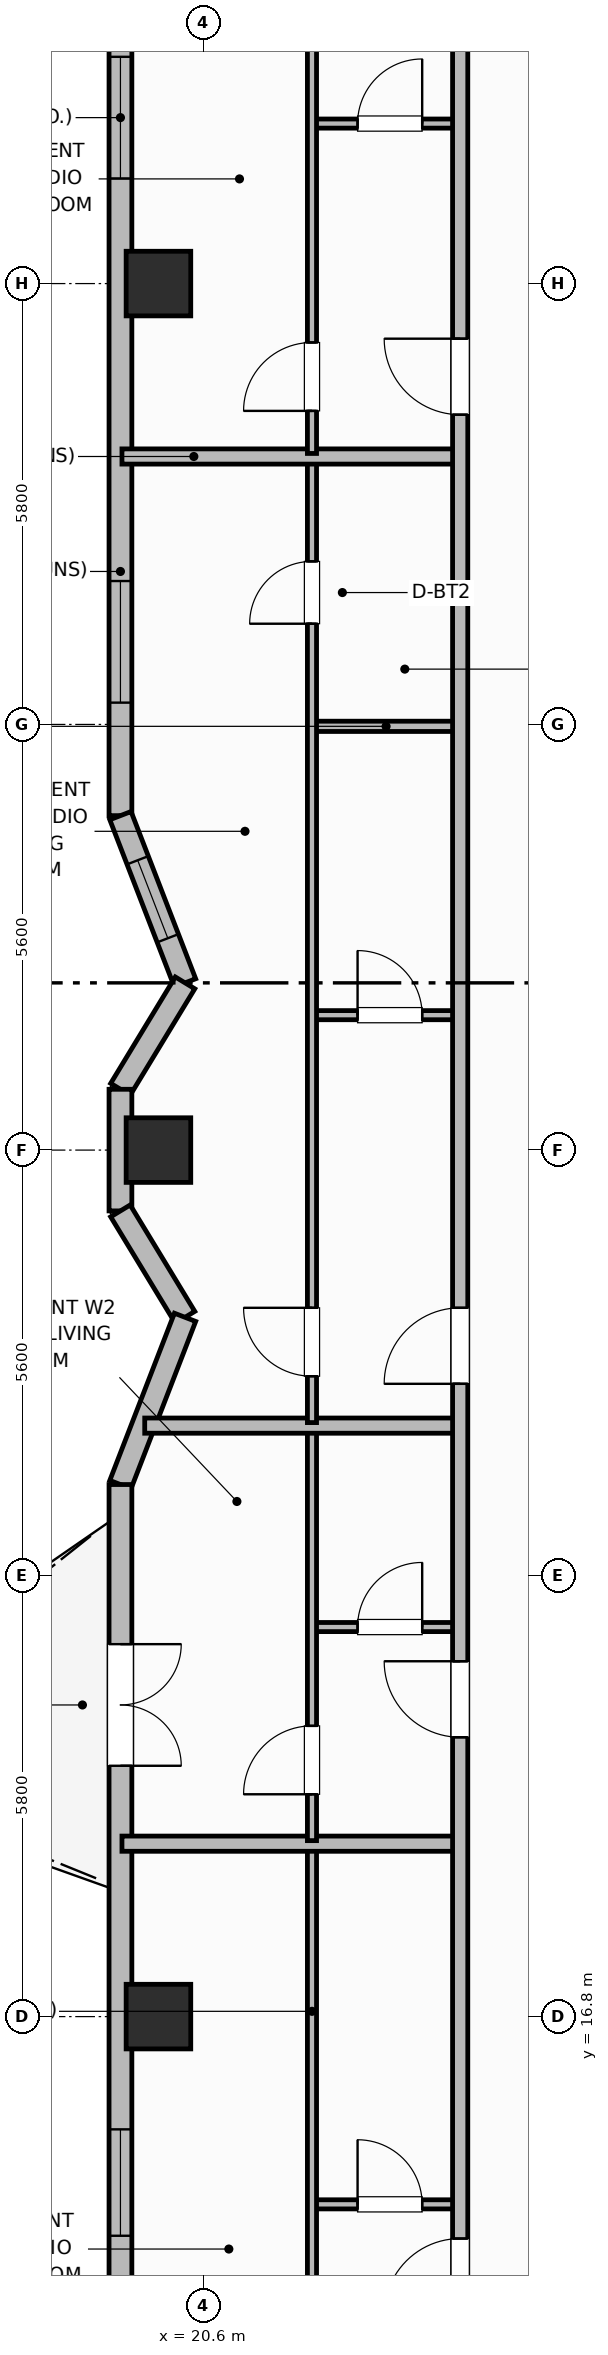
"""IFC4 building model, lengths in metres.
Left out: names, types, materials, properties, quantities, classifications, styles, units other than length and angle.
Written with IfcOpenShell. Run it as: python <this file> out.ifc"""

import sys

from ifc_helpers import new_model, si_unit, direction, frame, frame_2d, origin, origin_2d, place, context, subcontext, project, spatial, rectangle, extrude, element, fill, save


model = new_model("IFC4")
c1 = context("Model", 3, precision=1e-05, world=origin(), true_north=direction((0.0, 1.0)))
c2 = subcontext(c1, "Body", "Model", "MODEL_VIEW")
j1 = project(units=[si_unit("LENGTHUNIT", "METRE"), si_unit("PLANEANGLEUNIT", "RADIAN")], contexts=[c1])
p1 = place(None, origin())
s1 = spatial("IfcSite", under=j1, at=p1, CompositionType="ELEMENT")
p2 = place(p1, origin())
s2 = spatial("IfcBuilding", under=s1, at=p2, CompositionType="ELEMENT")
p3 = place(p2, frame((0.0, 0.0, 229.5)))
s3 = spatial("IfcBuildingStorey", under=s2, at=p3, CompositionType="ELEMENT", Elevation=229.5)
for number, where, z_axis, x_axis in (
    (1, (20.01, 16.8, 0.0), (0.0, 0.0, 1.0), (1.0, 0.0, 0.0)),
    (2, (20.01, 28.2, 0.0), (0.0, 0.0, 1.0), (1.0, 0.0, 0.0)),
    (3, (20.01, 39.6, 0.0), (0.0, 0.0, 1.0), (1.0, 0.0, 0.0)),
):
    element("IfcColumn", number, at=place(p3, frame(where, z_axis=z_axis, x_axis=x_axis)), inside=s3, PredefinedType="COLUMN", context=c2, shape_type="SweptSolid", body=[
        extrude(rectangle(XDim=0.85, YDim=0.85, at=origin_2d()), origin(), (0.0, 0.0, 1.0), 3.7),
    ])
p4 = place(p3, frame((19.51, 43.72, 0.0), z_axis=(0.0, 0.0, 1.0), x_axis=(0.0, -1.0, 0.0)))
e4 = element("IfcWall", 4, at=p4, inside=s3, PredefinedType="SOLIDWALL", context=c2, shape_type="SweptSolid", body=[
    extrude(rectangle(XDim=11.12, YDim=0.3, at=frame_2d((5.56, 0.0))), origin(), (0.0, 0.0, 1.0), 2.73),
])
p5 = place(p4, frame((1.137, 0.0, 0.71)))
e5 = element("IfcOpeningElement", 5, at=p5, cuts=e4, PredefinedType="OPENING", context=c2, shape_type="SweptSolid", body=[
    extrude(rectangle(XDim=1.6, YDim=1.9, at=frame_2d((0.8, 0.95))), frame((0.0, 0.16, 0.0), z_axis=(0.0, -1.0, 0.0), x_axis=(1.0, 0.0, 0.0)), (0.0, 0.0, 1.0), 0.32),
])
p6 = place(p4, frame((8.033, 0.0, 0.71)))
e6 = element("IfcOpeningElement", 6, at=p6, cuts=e4, PredefinedType="OPENING", context=c2, shape_type="SweptSolid", body=[
    extrude(rectangle(XDim=1.6, YDim=1.9, at=frame_2d((0.8, 0.95))), frame((0.0, 0.16, 0.0), z_axis=(0.0, -1.0, 0.0), x_axis=(1.0, 0.0, 0.0)), (0.0, 0.0, 1.0), 0.32),
])
p7 = place(p3, frame((19.51, 32.6, 0.0), z_axis=(0.0, 0.0, 1.0), x_axis=(0.36040746662, -0.932794971044, 0.0)))
e7 = element("IfcWall", 7, at=p7, inside=s3, PredefinedType="SOLIDWALL", context=c2, shape_type="SweptSolid", body=[
    extrude(rectangle(XDim=2.359, YDim=0.3, at=frame_2d((1.179, 0.0))), origin(), (0.0, 0.0, 1.0), 2.73),
])
p8 = place(p7, frame((0.629, 0.0, 0.92)))
e8 = element("IfcOpeningElement", 8, at=p8, cuts=e7, PredefinedType="OPENING", context=c2, shape_type="SweptSolid", body=[
    extrude(rectangle(XDim=1.1, YDim=1.65, at=frame_2d((0.55, 0.825))), frame((0.0, 0.16, 0.0), z_axis=(0.0, -1.0, 0.0), x_axis=(1.0, 0.0, 0.0)), (0.0, 0.0, 1.0), 0.32),
])
p9 = place(p3, frame((20.36, 30.4, 0.0), z_axis=(0.0, 0.0, 1.0), x_axis=(-0.5190481505, -0.854745001426, 0.0)))
e9 = element("IfcWall", 9, at=p9, inside=s3, PredefinedType="SOLIDWALL", context=c2, shape_type="SweptSolid", body=[
    extrude(rectangle(XDim=1.638, YDim=0.3, at=frame_2d((0.819, 0.0))), origin(), (0.0, 0.0, 1.0), 2.73),
])
p10 = place(p3, frame((19.51, 29.0, 0.0), z_axis=(0.0, 0.0, 1.0), x_axis=(0.0, -1.0, 0.0)))
e10 = element("IfcWall", 10, at=p10, inside=s3, PredefinedType="SOLIDWALL", context=c2, shape_type="SweptSolid", body=[
    extrude(rectangle(XDim=1.6, YDim=0.3, at=frame_2d((0.8, 0.0))), origin(), (0.0, 0.0, 1.0), 2.73),
])
p11 = place(p3, frame((19.51, 27.4, 0.0), z_axis=(0.0, 0.0, 1.0), x_axis=(0.5190481505, -0.854745001426, 0.0)))
e11 = element("IfcWall", 11, at=p11, inside=s3, PredefinedType="SOLIDWALL", context=c2, shape_type="SweptSolid", body=[
    extrude(rectangle(XDim=1.638, YDim=0.3, at=frame_2d((0.819, 0.0))), origin(), (0.0, 0.0, 1.0), 2.73),
])
p12 = place(p3, frame((20.36, 26.0, 0.0), z_axis=(0.0, 0.0, 1.0), x_axis=(-0.360442266984, -0.932781524351, 0.0)))
e12 = element("IfcWall", 12, at=p12, inside=s3, PredefinedType="SOLIDWALL", context=c2, shape_type="SweptSolid", body=[
    extrude(rectangle(XDim=2.358, YDim=0.3, at=frame_2d((1.179, 0.0))), origin(), (0.0, 0.0, 1.0), 2.73),
])
p13 = place(p3, frame((19.51, 23.8, 0.0), z_axis=(0.0, 0.0, 1.0), x_axis=(0.0, -1.0, 0.0)))
e13 = element("IfcWall", 13, at=p13, inside=s3, PredefinedType="SOLIDWALL", context=c2, shape_type="SweptSolid", body=[
    extrude(rectangle(XDim=11.12, YDim=0.3, at=frame_2d((5.56, 0.0))), origin(), (0.0, 0.0, 1.0), 2.73),
])
p14 = place(p13, frame((2.1, 0.0, 0.0)))
e14 = element("IfcOpeningElement", 14, at=p14, cuts=e13, PredefinedType="OPENING", context=c2, shape_type="SweptSolid", body=[
    extrude(rectangle(XDim=1.6, YDim=2.1, at=frame_2d((0.8, 1.05))), frame((0.0, 0.16, 0.0), z_axis=(0.0, -1.0, 0.0), x_axis=(1.0, 0.0, 0.0)), (0.0, 0.0, 1.0), 0.32),
])
p15 = place(p13, frame((8.483, 0.0, 0.76)))
e15 = element("IfcOpeningElement", 15, at=p15, cuts=e13, PredefinedType="OPENING", context=c2, shape_type="SweptSolid", body=[
    extrude(rectangle(XDim=1.4, YDim=1.85, at=frame_2d((0.7, 0.925))), frame((0.0, 0.16, 0.0), z_axis=(0.0, -1.0, 0.0), x_axis=(1.0, 0.0, 0.0)), (0.0, 0.0, 1.0), 0.32),
])
p16 = place(p3, frame((22.03, 14.33, 0.0), z_axis=(0.0, 0.0, 1.0), x_axis=(1.0, 0.0, 0.0)))
e16 = element("IfcWall", 16, at=p16, inside=s3, PredefinedType="PARTITIONING", context=c2, shape_type="SweptSolid", body=[
    extrude(rectangle(XDim=1.95, YDim=0.12, at=frame_2d((0.975, 0.0))), origin(), (0.0, 0.0, 1.0), 2.56),
])
p17 = place(p16, frame((0.6, 0.0, 0.0)))
e17 = element("IfcOpeningElement", 17, at=p17, cuts=e16, PredefinedType="OPENING", context=c2, shape_type="SweptSolid", body=[
    extrude(rectangle(XDim=0.85, YDim=2.1, at=frame_2d((0.425, 1.05))), frame((0.0, 0.07, 0.0), z_axis=(0.0, -1.0, 0.0), x_axis=(1.0, 0.0, 0.0)), (0.0, 0.0, 1.0), 0.14),
])
p18 = place(p3, frame((22.03, 9.99, 0.0), z_axis=(0.0, 0.0, 1.0), x_axis=(0.0, 1.0, 0.0)))
e18 = element("IfcWall", 18, at=p18, inside=s3, PredefinedType="PARTITIONING", context=c2, shape_type="SweptSolid", body=[
    extrude(rectangle(XDim=9.045, YDim=0.12, at=frame_2d((4.522, 0.0))), origin(), (0.0, 0.0, 1.0), 2.56),
])
p19 = place(p18, frame((0.41, 0.0, 0.0)))
e19 = element("IfcOpeningElement", 19, at=p19, cuts=e18, PredefinedType="OPENING", context=c2, shape_type="SweptSolid", body=[
    extrude(rectangle(XDim=0.9, YDim=2.1, at=frame_2d((0.45, 1.05))), frame((0.0, 0.07, 0.0), z_axis=(0.0, -1.0, 0.0), x_axis=(1.0, 0.0, 0.0)), (0.0, 0.0, 1.0), 0.14),
])
p20 = place(p3, frame((19.53, 19.075, 0.0), z_axis=(0.0, 0.0, 1.0), x_axis=(1.0, 0.0, 0.0)))
e20 = element("IfcWall", 20, at=p20, inside=s3, PredefinedType="PARTITIONING", context=c2, shape_type="SweptSolid", body=[
    extrude(rectangle(XDim=4.45, YDim=0.2, at=frame_2d((2.225, 0.0))), origin(), (0.0, 0.0, 1.0), 2.56),
])
p21 = place(p3, frame((22.03, 21.925, 0.0), z_axis=(0.0, 0.0, 1.0), x_axis=(1.0, 0.0, 0.0)))
e21 = element("IfcWall", 21, at=p21, inside=s3, PredefinedType="PARTITIONING", context=c2, shape_type="SweptSolid", body=[
    extrude(rectangle(XDim=1.95, YDim=0.12, at=frame_2d((0.975, 0.0))), origin(), (0.0, 0.0, 1.0), 2.56),
])
p22 = place(p21, frame((0.6, 0.0, 0.0)))
e22 = element("IfcOpeningElement", 22, at=p22, cuts=e21, PredefinedType="OPENING", context=c2, shape_type="SweptSolid", body=[
    extrude(rectangle(XDim=0.85, YDim=2.1, at=frame_2d((0.425, 1.05))), frame((0.0, 0.07, 0.0), z_axis=(0.0, -1.0, 0.0), x_axis=(1.0, 0.0, 0.0)), (0.0, 0.0, 1.0), 0.14),
])
p23 = place(p3, frame((22.03, 19.115, 0.0), z_axis=(0.0, 0.0, 1.0), x_axis=(0.0, 1.0, 0.0)))
e23 = element("IfcWall", 23, at=p23, inside=s3, PredefinedType="PARTITIONING", context=c2, shape_type="SweptSolid", body=[
    extrude(rectangle(XDim=5.42, YDim=0.12, at=frame_2d((2.71, 0.0))), origin(), (0.0, 0.0, 1.0), 2.56),
])
p24 = place(p23, frame((0.61, 0.0, 0.0)))
e24 = element("IfcOpeningElement", 24, at=p24, cuts=e23, PredefinedType="OPENING", context=c2, shape_type="SweptSolid", body=[
    extrude(rectangle(XDim=0.9, YDim=2.1, at=frame_2d((0.45, 1.05))), frame((0.0, 0.07, 0.0), z_axis=(0.0, -1.0, 0.0), x_axis=(1.0, 0.0, 0.0)), (0.0, 0.0, 1.0), 0.14),
])
p25 = place(p3, frame((19.829, 24.575, 0.0), z_axis=(0.0, 0.0, 1.0), x_axis=(1.0, 0.0, 0.0)))
e25 = element("IfcWall", 25, at=p25, inside=s3, PredefinedType="PARTITIONING", context=c2, shape_type="SweptSolid", body=[
    extrude(rectangle(XDim=4.151, YDim=0.2, at=frame_2d((2.075, 0.0))), origin(), (0.0, 0.0, 1.0), 2.56),
])
p26 = place(p3, frame((22.03, 29.975, 0.0), z_axis=(0.0, 0.0, 1.0), x_axis=(1.0, 0.0, 0.0)))
e26 = element("IfcWall", 26, at=p26, inside=s3, PredefinedType="PARTITIONING", context=c2, shape_type="SweptSolid", body=[
    extrude(rectangle(XDim=1.95, YDim=0.12, at=frame_2d((0.975, 0.0))), origin(), (0.0, 0.0, 1.0), 2.56),
])
p27 = place(p26, frame((0.6, 0.0, 0.0)))
e27 = element("IfcOpeningElement", 27, at=p27, cuts=e26, PredefinedType="OPENING", context=c2, shape_type="SweptSolid", body=[
    extrude(rectangle(XDim=0.85, YDim=2.1, at=frame_2d((0.425, 1.05))), frame((0.0, 0.07, 0.0), z_axis=(0.0, -1.0, 0.0), x_axis=(1.0, 0.0, 0.0)), (0.0, 0.0, 1.0), 0.14),
])
p28 = place(p3, frame((22.03, 33.775, 0.0), z_axis=(0.0, 0.0, 1.0), x_axis=(1.0, 0.0, 0.0)))
e28 = element("IfcWall", 28, at=p28, inside=s3, PredefinedType="PARTITIONING", context=c2, shape_type="SweptSolid", body=[
    extrude(rectangle(XDim=1.95, YDim=0.135, at=frame_2d((0.975, 0.0))), origin(), (0.0, 0.0, 1.0), 2.56),
])
p29 = place(p3, frame((22.03, 24.615, 0.0), z_axis=(0.0, 0.0, 1.0), x_axis=(0.0, 1.0, 0.0)))
e29 = element("IfcWall", 29, at=p29, inside=s3, PredefinedType="PARTITIONING", context=c2, shape_type="SweptSolid", body=[
    extrude(rectangle(XDim=12.67, YDim=0.12, at=frame_2d((6.335, 0.0))), origin(), (0.0, 0.0, 1.0), 2.56),
])
p30 = place(p29, frame((0.61, 0.0, 0.0)))
e30 = element("IfcOpeningElement", 30, at=p30, cuts=e29, PredefinedType="OPENING", context=c2, shape_type="SweptSolid", body=[
    extrude(rectangle(XDim=0.9, YDim=2.1, at=frame_2d((0.45, 1.05))), frame((0.0, 0.07, 0.0), z_axis=(0.0, -1.0, 0.0), x_axis=(1.0, 0.0, 0.0)), (0.0, 0.0, 1.0), 0.14),
])
p31 = place(p29, frame((10.51, 0.0, 0.0)))
e31 = element("IfcOpeningElement", 31, at=p31, cuts=e29, PredefinedType="OPENING", context=c2, shape_type="SweptSolid", body=[
    extrude(rectangle(XDim=0.82, YDim=2.08, at=frame_2d((0.41, 1.04))), frame((0.0, 0.07, 0.0), z_axis=(0.0, -1.0, 0.0), x_axis=(1.0, 0.0, 0.0)), (0.0, 0.0, 1.0), 0.14),
])
p32 = place(p3, frame((19.53, 37.325, 0.0), z_axis=(0.0, 0.0, 1.0), x_axis=(1.0, 0.0, 0.0)))
e32 = element("IfcWall", 32, at=p32, inside=s3, PredefinedType="PARTITIONING", context=c2, shape_type="SweptSolid", body=[
    extrude(rectangle(XDim=4.45, YDim=0.2, at=frame_2d((2.225, 0.0))), origin(), (0.0, 0.0, 1.0), 2.56),
])
p33 = place(p3, frame((22.03, 41.705, 0.0), z_axis=(0.0, 0.0, 1.0), x_axis=(1.0, 0.0, 0.0)))
e33 = element("IfcWall", 33, at=p33, inside=s3, PredefinedType="PARTITIONING", context=c2, shape_type="SweptSolid", body=[
    extrude(rectangle(XDim=1.95, YDim=0.12, at=frame_2d((0.975, 0.0))), origin(), (0.0, 0.0, 1.0), 2.56),
])
p34 = place(p33, frame((0.6, 0.0, 0.0)))
e34 = element("IfcOpeningElement", 34, at=p34, cuts=e33, PredefinedType="OPENING", context=c2, shape_type="SweptSolid", body=[
    extrude(rectangle(XDim=0.85, YDim=2.1, at=frame_2d((0.425, 1.05))), frame((0.0, 0.07, 0.0), z_axis=(0.0, -1.0, 0.0), x_axis=(1.0, 0.0, 0.0)), (0.0, 0.0, 1.0), 0.14),
])
p35 = place(p3, frame((22.03, 37.365, 0.0), z_axis=(0.0, 0.0, 1.0), x_axis=(0.0, 1.0, 0.0)))
e35 = element("IfcWall", 35, at=p35, inside=s3, PredefinedType="PARTITIONING", context=c2, shape_type="SweptSolid", body=[
    extrude(rectangle(XDim=9.045, YDim=0.12, at=frame_2d((4.522, 0.0))), origin(), (0.0, 0.0, 1.0), 2.56),
])
p36 = place(p35, frame((0.56, 0.0, 0.0)))
e36 = element("IfcOpeningElement", 36, at=p36, cuts=e35, PredefinedType="OPENING", context=c2, shape_type="SweptSolid", body=[
    extrude(rectangle(XDim=0.9, YDim=2.1, at=frame_2d((0.45, 1.05))), frame((0.0, 0.07, 0.0), z_axis=(0.0, -1.0, 0.0), x_axis=(1.0, 0.0, 0.0)), (0.0, 0.0, 1.0), 0.14),
])
p37 = place(p3, frame((23.98, 9.95, 0.0), z_axis=(0.0, 0.0, 1.0), x_axis=(0.0, 1.0, 0.0)))
e37 = element("IfcWall", 37, at=p37, inside=s3, PredefinedType="PARTITIONING", context=c2, shape_type="SweptSolid", body=[
    extrude(rectangle(XDim=36.5, YDim=0.2, at=frame_2d((18.25, 0.0))), origin(), (0.0, 0.0, 1.0), 2.56),
])
p38 = place(p37, frame((2.93, 0.0, 0.0)))
e38 = element("IfcOpeningElement", 38, at=p38, cuts=e37, PredefinedType="OPENING", context=c2, shape_type="SweptSolid", body=[
    extrude(rectangle(XDim=1.0, YDim=2.15, at=frame_2d((0.5, 1.075))), frame((0.0, 0.11, 0.0), z_axis=(0.0, -1.0, 0.0), x_axis=(1.0, 0.0, 0.0)), (0.0, 0.0, 1.0), 0.22),
])
p39 = place(p37, frame((10.525, 0.0, 0.0)))
e39 = element("IfcOpeningElement", 39, at=p39, cuts=e37, PredefinedType="OPENING", context=c2, shape_type="SweptSolid", body=[
    extrude(rectangle(XDim=1.0, YDim=2.15, at=frame_2d((0.5, 1.075))), frame((0.0, 0.11, 0.0), z_axis=(0.0, -1.0, 0.0), x_axis=(1.0, 0.0, 0.0)), (0.0, 0.0, 1.0), 0.22),
])
p40 = place(p37, frame((15.175, 0.0, 0.0)))
e40 = element("IfcOpeningElement", 40, at=p40, cuts=e37, PredefinedType="OPENING", context=c2, shape_type="SweptSolid", body=[
    extrude(rectangle(XDim=1.0, YDim=2.15, at=frame_2d((0.5, 1.075))), frame((0.0, 0.11, 0.0), z_axis=(0.0, -1.0, 0.0), x_axis=(1.0, 0.0, 0.0)), (0.0, 0.0, 1.0), 0.22),
])
p41 = place(p37, frame((27.925, 0.0, 0.0)))
e41 = element("IfcOpeningElement", 41, at=p41, cuts=e37, PredefinedType="OPENING", context=c2, shape_type="SweptSolid", body=[
    extrude(rectangle(XDim=1.0, YDim=2.15, at=frame_2d((0.5, 1.075))), frame((0.0, 0.11, 0.0), z_axis=(0.0, -1.0, 0.0), x_axis=(1.0, 0.0, 0.0)), (0.0, 0.0, 1.0), 0.22),
])
p42 = place(p5, origin())
e42 = element("IfcWindow", 42, at=p42, inside=s3, PartitioningType="SINGLE_PANEL", PredefinedType="WINDOW", context=c2, shape_type="SweptSolid", body=[
    extrude(rectangle(XDim=1.6, YDim=1.9, at=frame_2d((0.8, 0.95))), frame((0.0, 0.03, 0.0), z_axis=(0.0, -1.0, 0.0), x_axis=(1.0, 0.0, 0.0)), (0.0, 0.0, 1.0), 0.06),
])
fill(e5, e42)
p43 = place(p6, origin())
e43 = element("IfcWindow", 43, at=p43, inside=s3, PartitioningType="SINGLE_PANEL", PredefinedType="WINDOW", context=c2, shape_type="SweptSolid", body=[
    extrude(rectangle(XDim=1.6, YDim=1.9, at=frame_2d((0.8, 0.95))), frame((0.0, 0.03, 0.0), z_axis=(0.0, -1.0, 0.0), x_axis=(1.0, 0.0, 0.0)), (0.0, 0.0, 1.0), 0.06),
])
fill(e6, e43)
p44 = place(p8, origin())
e44 = element("IfcWindow", 44, at=p44, inside=s3, PartitioningType="SINGLE_PANEL", PredefinedType="WINDOW", context=c2, shape_type="SweptSolid", body=[
    extrude(rectangle(XDim=1.1, YDim=1.65, at=frame_2d((0.55, 0.825))), frame((0.0, 0.03, 0.0), z_axis=(0.0, -1.0, 0.0), x_axis=(1.0, 0.0, 0.0)), (0.0, 0.0, 1.0), 0.06),
])
fill(e8, e44)
p45 = place(p14, origin())
e45 = element("IfcDoor", 45, at=p45, inside=s3, OperationType="DOUBLE_DOOR_SINGLE_SWING", PredefinedType="DOOR", context=c2, shape_type="SweptSolid", body=[
    extrude(rectangle(XDim=1.6, YDim=2.1, at=frame_2d((0.8, 1.05))), frame((0.0, 0.025, 0.0), z_axis=(0.0, -1.0, 0.0), x_axis=(1.0, 0.0, 0.0)), (0.0, 0.0, 1.0), 0.05),
])
fill(e14, e45)
p46 = place(p15, origin())
e46 = element("IfcWindow", 46, at=p46, inside=s3, PartitioningType="SINGLE_PANEL", PredefinedType="WINDOW", context=c2, shape_type="SweptSolid", body=[
    extrude(rectangle(XDim=1.4, YDim=1.85, at=frame_2d((0.7, 0.925))), frame((0.0, 0.03, 0.0), z_axis=(0.0, -1.0, 0.0), x_axis=(1.0, 0.0, 0.0)), (0.0, 0.0, 1.0), 0.06),
])
fill(e15, e46)
p47 = place(p17, origin())
e47 = element("IfcDoor", 47, at=p47, inside=s3, OperationType="SINGLE_SWING_LEFT", PredefinedType="DOOR", context=c2, shape_type="SweptSolid", body=[
    extrude(rectangle(XDim=0.85, YDim=2.1, at=frame_2d((0.425, 1.05))), frame((0.0, 0.025, 0.0), z_axis=(0.0, -1.0, 0.0), x_axis=(1.0, 0.0, 0.0)), (0.0, 0.0, 1.0), 0.05),
])
fill(e17, e47)
p48 = place(p22, origin())
e48 = element("IfcDoor", 48, at=p48, inside=s3, OperationType="SINGLE_SWING_RIGHT", PredefinedType="DOOR", context=c2, shape_type="SweptSolid", body=[
    extrude(rectangle(XDim=0.85, YDim=2.1, at=frame_2d((0.425, 1.05))), frame((0.0, 0.025, 0.0), z_axis=(0.0, -1.0, 0.0), x_axis=(1.0, 0.0, 0.0)), (0.0, 0.0, 1.0), 0.05),
])
fill(e22, e48)
p49 = place(p24, origin())
e49 = element("IfcDoor", 49, at=p49, inside=s3, OperationType="SINGLE_SWING_LEFT", PredefinedType="DOOR", context=c2, shape_type="SweptSolid", body=[
    extrude(rectangle(XDim=0.9, YDim=2.1, at=frame_2d((0.45, 1.05))), frame((0.0, 0.025, 0.0), z_axis=(0.0, -1.0, 0.0), x_axis=(1.0, 0.0, 0.0)), (0.0, 0.0, 1.0), 0.05),
])
fill(e24, e49)
p50 = place(p27, origin())
e50 = element("IfcDoor", 50, at=p50, inside=s3, OperationType="SINGLE_SWING_LEFT", PredefinedType="DOOR", context=c2, shape_type="SweptSolid", body=[
    extrude(rectangle(XDim=0.85, YDim=2.1, at=frame_2d((0.425, 1.05))), frame((0.0, 0.025, 0.0), z_axis=(0.0, -1.0, 0.0), x_axis=(1.0, 0.0, 0.0)), (0.0, 0.0, 1.0), 0.05),
])
fill(e27, e50)
p51 = place(p30, origin())
e51 = element("IfcDoor", 51, at=p51, inside=s3, OperationType="SINGLE_SWING_RIGHT", PredefinedType="DOOR", context=c2, shape_type="SweptSolid", body=[
    extrude(rectangle(XDim=0.9, YDim=2.1, at=frame_2d((0.45, 1.05))), frame((0.0, 0.025, 0.0), z_axis=(0.0, -1.0, 0.0), x_axis=(1.0, 0.0, 0.0)), (0.0, 0.0, 1.0), 0.05),
])
fill(e30, e51)
p52 = place(p31, origin())
e52 = element("IfcDoor", 52, at=p52, inside=s3, OperationType="SINGLE_SWING_LEFT", PredefinedType="DOOR", context=c2, shape_type="SweptSolid", body=[
    extrude(rectangle(XDim=0.82, YDim=2.08, at=frame_2d((0.41, 1.04))), frame((0.0, 0.025, 0.0), z_axis=(0.0, -1.0, 0.0), x_axis=(1.0, 0.0, 0.0)), (0.0, 0.0, 1.0), 0.05),
])
fill(e31, e52)
p53 = place(p34, origin())
e53 = element("IfcDoor", 53, at=p53, inside=s3, OperationType="SINGLE_SWING_RIGHT", PredefinedType="DOOR", context=c2, shape_type="SweptSolid", body=[
    extrude(rectangle(XDim=0.85, YDim=2.1, at=frame_2d((0.425, 1.05))), frame((0.0, 0.025, 0.0), z_axis=(0.0, -1.0, 0.0), x_axis=(1.0, 0.0, 0.0)), (0.0, 0.0, 1.0), 0.05),
])
fill(e34, e53)
p54 = place(p36, origin())
e54 = element("IfcDoor", 54, at=p54, inside=s3, OperationType="SINGLE_SWING_LEFT", PredefinedType="DOOR", context=c2, shape_type="SweptSolid", body=[
    extrude(rectangle(XDim=0.9, YDim=2.1, at=frame_2d((0.45, 1.05))), frame((0.0, 0.025, 0.0), z_axis=(0.0, -1.0, 0.0), x_axis=(1.0, 0.0, 0.0)), (0.0, 0.0, 1.0), 0.05),
])
fill(e36, e54)
p55 = place(p38, origin())
e55 = element("IfcDoor", 55, at=p55, inside=s3, OperationType="SINGLE_SWING_LEFT", PredefinedType="DOOR", context=c2, shape_type="SweptSolid", body=[
    extrude(rectangle(XDim=1.0, YDim=2.15, at=frame_2d((0.5, 1.075))), frame((0.0, 0.025, 0.0), z_axis=(0.0, -1.0, 0.0), x_axis=(1.0, 0.0, 0.0)), (0.0, 0.0, 1.0), 0.05),
])
fill(e38, e55)
p56 = place(p39, origin())
e56 = element("IfcDoor", 56, at=p56, inside=s3, OperationType="SINGLE_SWING_RIGHT", PredefinedType="DOOR", context=c2, shape_type="SweptSolid", body=[
    extrude(rectangle(XDim=1.0, YDim=2.15, at=frame_2d((0.5, 1.075))), frame((0.0, 0.025, 0.0), z_axis=(0.0, -1.0, 0.0), x_axis=(1.0, 0.0, 0.0)), (0.0, 0.0, 1.0), 0.05),
])
fill(e39, e56)
p57 = place(p40, origin())
e57 = element("IfcDoor", 57, at=p57, inside=s3, OperationType="SINGLE_SWING_LEFT", PredefinedType="DOOR", context=c2, shape_type="SweptSolid", body=[
    extrude(rectangle(XDim=1.0, YDim=2.15, at=frame_2d((0.5, 1.075))), frame((0.0, 0.025, 0.0), z_axis=(0.0, -1.0, 0.0), x_axis=(1.0, 0.0, 0.0)), (0.0, 0.0, 1.0), 0.05),
])
fill(e40, e57)
p58 = place(p41, origin())
e58 = element("IfcDoor", 58, at=p58, inside=s3, OperationType="SINGLE_SWING_RIGHT", PredefinedType="DOOR", context=c2, shape_type="SweptSolid", body=[
    extrude(rectangle(XDim=1.0, YDim=2.15, at=frame_2d((0.5, 1.075))), frame((0.0, 0.025, 0.0), z_axis=(0.0, -1.0, 0.0), x_axis=(1.0, 0.0, 0.0)), (0.0, 0.0, 1.0), 0.05),
])
fill(e41, e58)
save(model, sys.argv[1])
